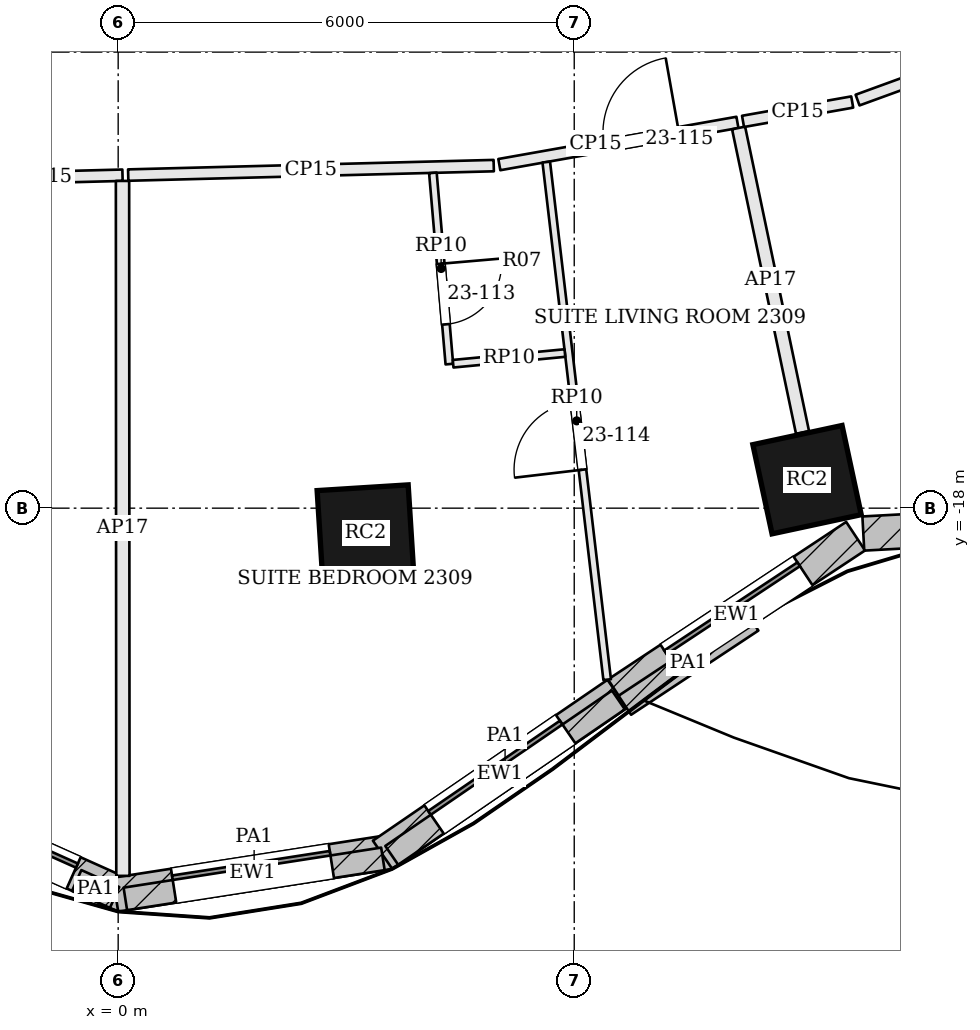
"""IFC4 building model, lengths in metres.
Left out: names, types, materials, properties, quantities, classifications, styles, units other than length and angle.
Written with IfcOpenShell. Run it as: python <this file> out.ifc"""

import sys

from ifc_helpers import new_model, si_unit, direction, frame, frame_2d, origin, origin_2d, place, context, subcontext, project, spatial, rectangle, extrude, element, fill, save


model = new_model("IFC4")
c1 = context("Model", 3, precision=1e-05, world=origin(), true_north=direction((0.0, 1.0)))
c2 = subcontext(c1, "Body", "Model", "MODEL_VIEW")
j1 = project(units=[si_unit("LENGTHUNIT", "METRE"), si_unit("PLANEANGLEUNIT", "RADIAN")], contexts=[c1])
p1 = place(None, origin())
s1 = spatial("IfcSite", under=j1, at=p1, CompositionType="ELEMENT")
p2 = place(p1, origin())
s2 = spatial("IfcBuilding", under=s1, at=p2, CompositionType="ELEMENT")
p3 = place(p2, frame((0.0, 0.0, 99.6)))
s3 = spatial("IfcBuildingStorey", under=s2, at=p3, CompositionType="ELEMENT", Elevation=99.6)
for number, where, z_axis, x_axis in (
    (1, (3.254, -18.33, 0.0), (0.0, 0.0, 1.0), (0.998, 0.063, 0.0)),
    (2, (9.063, -17.625, 0.0), (0.0, 0.0, 1.0), (0.978, 0.21, 0.0)),
):
    element("IfcColumn", number, at=place(p3, frame(where, z_axis=z_axis, x_axis=x_axis)), inside=s3, PredefinedType="COLUMN", context=c2, shape_type="SweptSolid", body=[
        extrude(rectangle(XDim=1.2, YDim=1.2, at=origin_2d()), origin(), (0.0, 0.0, 1.0), 3.6),
    ])
p4 = place(p3, frame((-3.179, -21.636, 0.0), z_axis=(0.0, 0.0, 1.0), x_axis=(0.912608353595, -0.40883492139, 0.0)))
e3 = element("IfcWall", 3, at=p4, inside=s3, PredefinedType="SOLIDWALL", context=c2, shape_type="SweptSolid", body=[
    extrude(rectangle(XDim=3.585, YDim=0.45, at=frame_2d((1.792, 0.0))), origin(), (0.0, 0.0, 1.0), 3.4),
])
p5 = place(p4, frame((0.742, 0.0, 0.9)))
e4 = element("IfcOpeningElement", 4, at=p5, cuts=e3, PredefinedType="OPENING", context=c2, shape_type="SweptSolid", body=[
    extrude(rectangle(XDim=2.1, YDim=2.0, at=frame_2d((1.05, 1.0))), frame((0.0, 0.235, 0.0), z_axis=(0.0, -1.0, 0.0), x_axis=(1.0, 0.0, 0.0)), (0.0, 0.0, 1.0), 0.47),
])
p6 = place(p3, frame((-0.035, -23.085, 0.0), z_axis=(0.0, 0.0, 1.0), x_axis=(0.988133637562, 0.153596596054, 0.0)))
e5 = element("IfcWall", 5, at=p6, inside=s3, PredefinedType="SOLIDWALL", context=c2, shape_type="SweptSolid", body=[
    extrude(rectangle(XDim=3.646, YDim=0.45, at=frame_2d((1.823, 0.0))), origin(), (0.0, 0.0, 1.0), 3.4),
])
p7 = place(p6, frame((0.773, 0.0, 0.9)))
e6 = element("IfcOpeningElement", 6, at=p7, cuts=e5, PredefinedType="OPENING", context=c2, shape_type="SweptSolid", body=[
    extrude(rectangle(XDim=2.1, YDim=2.0, at=frame_2d((1.05, 1.0))), frame((0.0, 0.235, 0.0), z_axis=(0.0, -1.0, 0.0), x_axis=(1.0, 0.0, 0.0)), (0.0, 0.0, 1.0), 0.47),
])
p8 = place(p3, frame((3.479, -22.56, 0.0), z_axis=(0.0, 0.0, 1.0), x_axis=(0.824722766417, 0.565537230033, 0.0)))
e7 = element("IfcWall", 7, at=p8, inside=s3, PredefinedType="SOLIDWALL", context=c2, shape_type="SweptSolid", body=[
    extrude(rectangle(XDim=3.742, YDim=0.45, at=frame_2d((1.871, 0.0))), origin(), (0.0, 0.0, 1.0), 3.4),
])
p9 = place(p8, frame((0.821, 0.0, 0.9)))
e8 = element("IfcOpeningElement", 8, at=p9, cuts=e7, PredefinedType="OPENING", context=c2, shape_type="SweptSolid", body=[
    extrude(rectangle(XDim=2.1, YDim=2.0, at=frame_2d((1.05, 1.0))), frame((0.0, 0.235, 0.0), z_axis=(0.0, -1.0, 0.0), x_axis=(1.0, 0.0, 0.0)), (0.0, 0.0, 1.0), 0.47),
])
p10 = place(p3, frame((6.568, -20.441, 0.0), z_axis=(0.0, 0.0, 1.0), x_axis=(0.834034214531, 0.551712723246, 0.0)))
e9 = element("IfcWall", 9, at=p10, inside=s3, PredefinedType="SOLIDWALL", context=c2, shape_type="SweptSolid", body=[
    extrude(rectangle(XDim=3.757, YDim=0.45, at=frame_2d((1.879, 0.0))), origin(), (0.0, 0.0, 1.0), 3.4),
])
p11 = place(p10, frame((0.829, 0.0, 0.9)))
e10 = element("IfcOpeningElement", 10, at=p11, cuts=e9, PredefinedType="OPENING", context=c2, shape_type="SweptSolid", body=[
    extrude(rectangle(XDim=2.1, YDim=2.0, at=frame_2d((1.05, 1.0))), frame((0.0, 0.235, 0.0), z_axis=(0.0, -1.0, 0.0), x_axis=(1.0, 0.0, 0.0)), (0.0, 0.0, 1.0), 0.47),
])
p12 = place(p3, frame((9.803, -18.334, 0.0), z_axis=(0.0, 0.0, 1.0), x_axis=(0.998525941495, 0.054276552602, 0.0)))
e11 = element("IfcWall", 11, at=p12, inside=s3, PredefinedType="SOLIDWALL", context=c2, shape_type="SweptSolid", body=[
    extrude(rectangle(XDim=3.603, YDim=0.45, at=frame_2d((1.802, 0.0))), origin(), (0.0, 0.0, 1.0), 3.4),
])
p13 = place(p12, frame((0.751, 0.0, 0.9)))
e12 = element("IfcOpeningElement", 12, at=p13, cuts=e11, PredefinedType="OPENING", context=c2, shape_type="SweptSolid", body=[
    extrude(rectangle(XDim=2.1, YDim=2.0, at=frame_2d((1.05, 1.0))), frame((0.0, 0.235, 0.0), z_axis=(0.0, -1.0, 0.0), x_axis=(1.0, 0.0, 0.0)), (0.0, 0.0, 1.0), 0.47),
])
p14 = place(p3, frame((-0.545, -22.898, 3.6), z_axis=(0.0, 0.0, 1.0), x_axis=(0.912497815069, -0.409081578044, 0.0)))
e13 = element("IfcWall", 13, at=p14, inside=s3, PredefinedType="PARAPET", context=c2, shape_type="SweptSolid", body=[
    extrude(rectangle(XDim=0.546, YDim=0.3, at=frame_2d((0.273, 0.0))), origin(), (0.0, 0.0, 1.0), 1.1),
])
p15 = place(p3, frame((0.094, -23.14, 3.6), z_axis=(0.0, 0.0, 1.0), x_axis=(0.988150084887, 0.153490748056, 0.0)))
e14 = element("IfcWall", 14, at=p15, inside=s3, PredefinedType="PARAPET", context=c2, shape_type="SweptSolid", body=[
    extrude(rectangle(XDim=3.429, YDim=0.3, at=frame_2d((1.715, 0.0))), origin(), (0.0, 0.0, 1.0), 1.1),
])
p16 = place(p3, frame((3.599, -22.568, 3.6), z_axis=(0.0, 0.0, 1.0), x_axis=(0.82476034254, 0.565482428881, 0.0)))
e15 = element("IfcWall", 15, at=p16, inside=s3, PredefinedType="PARAPET", context=c2, shape_type="SweptSolid", body=[
    extrude(rectangle(XDim=3.616, YDim=0.3, at=frame_2d((1.808, 0.0))), origin(), (0.0, 0.0, 1.0), 1.1),
])
p17 = place(p3, frame((6.665, -20.593, 3.6), z_axis=(0.0, 0.0, 1.0), x_axis=(0.834027642059, 0.551722658843, 0.0)))
e16 = element("IfcWall", 16, at=p17, inside=s3, PredefinedType="PARAPET", context=c2, shape_type="SweptSolid", body=[
    extrude(rectangle(XDim=2.008, YDim=0.3, at=frame_2d((1.004, 0.0))), origin(), (0.0, 0.0, 1.0), 1.1),
])
p18 = place(p3, frame((-1.957, -13.672, 0.0), z_axis=(0.0, 0.0, 1.0), x_axis=(0.999663662109, 0.025933813031, 0.0)))
e17 = element("IfcWall", 17, at=p18, inside=s3, PredefinedType="PARTITIONING", context=c2, shape_type="SweptSolid", body=[
    extrude(rectangle(XDim=2.015, YDim=0.15, at=frame_2d((1.007, 0.0))), origin(), (0.0, 0.0, 1.0), 2.784),
])
p19 = place(p3, frame((0.062, -22.837, 0.0), z_axis=(0.0, 0.0, 1.0), x_axis=(-0.000614184887, 0.999999811388, 0.0)))
e18 = element("IfcWall", 18, at=p19, inside=s3, PredefinedType="PARTITIONING", context=c2, shape_type="SweptSolid", body=[
    extrude(rectangle(XDim=9.143, YDim=0.175, at=frame_2d((4.571, 0.0))), origin(), (0.0, 0.0, 1.0), 2.784),
])
p20 = place(p3, frame((0.132, -13.618, 0.0), z_axis=(0.0, 0.0, 1.0), x_axis=(0.999664963682, 0.025883593008, 0.0)))
e19 = element("IfcWall", 19, at=p20, inside=s3, PredefinedType="PARTITIONING", context=c2, shape_type="SweptSolid", body=[
    extrude(rectangle(XDim=4.811, YDim=0.15, at=frame_2d((2.405, 0.0))), origin(), (0.0, 0.0, 1.0), 2.784),
])
p21 = place(p3, frame((5.015, -13.48, 0.0), z_axis=(0.0, 0.0, 1.0), x_axis=(0.984640294338, 0.174595219768, 0.0)))
e20 = element("IfcWall", 20, at=p21, inside=s3, PredefinedType="PARTITIONING", context=c2, shape_type="SweptSolid", body=[
    extrude(rectangle(XDim=3.181, YDim=0.15, at=frame_2d((1.591, 0.0))), origin(), (0.0, 0.0, 1.0), 2.784),
])
p22 = place(p21, frame((1.4, 0.0, 0.0)))
e21 = element("IfcOpeningElement", 21, at=p22, cuts=e20, PredefinedType="OPENING", context=c2, shape_type="SweptSolid", body=[
    extrude(rectangle(XDim=1.0, YDim=2.1, at=frame_2d((0.5, 1.05))), frame((0.0, 0.085, 0.0), z_axis=(0.0, -1.0, 0.0), x_axis=(1.0, 0.0, 0.0)), (0.0, 0.0, 1.0), 0.17),
])
p23 = place(p3, frame((9.003, -17.004, 0.0), z_axis=(0.0, 0.0, 1.0), x_axis=(-0.205490383359, 0.978659134912, 0.0)))
e22 = element("IfcWall", 22, at=p23, inside=s3, PredefinedType="PARTITIONING", context=c2, shape_type="SweptSolid", body=[
    extrude(rectangle(XDim=4.093, YDim=0.175, at=frame_2d((2.046, 0.0))), origin(), (0.0, 0.0, 1.0), 2.784),
])
p24 = place(p3, frame((8.221, -12.912, 0.0), z_axis=(0.0, 0.0, 1.0), x_axis=(0.984645082055, 0.174568216995, 0.0)))
e23 = element("IfcWall", 23, at=p24, inside=s3, PredefinedType="PARTITIONING", context=c2, shape_type="SweptSolid", body=[
    extrude(rectangle(XDim=1.459, YDim=0.15, at=frame_2d((0.729, 0.0))), origin(), (0.0, 0.0, 1.0), 2.784),
])
p25 = place(p3, frame((9.728, -12.631, 0.0), z_axis=(0.0, 0.0, 1.0), x_axis=(0.939626438181, 0.342201923826, 0.0)))
e24 = element("IfcWall", 24, at=p25, inside=s3, PredefinedType="PARTITIONING", context=c2, shape_type="SweptSolid", body=[
    extrude(rectangle(XDim=3.716, YDim=0.15, at=frame_2d((1.858, 0.0))), origin(), (0.0, 0.0, 1.0), 2.784),
])
p26 = place(p25, frame((1.45, 0.0, 0.0)))
e25 = element("IfcOpeningElement", 25, at=p26, cuts=e24, PredefinedType="OPENING", context=c2, shape_type="SweptSolid", body=[
    extrude(rectangle(XDim=1.8, YDim=2.1, at=frame_2d((0.9, 1.05))), frame((0.0, 0.085, 0.0), z_axis=(0.0, -1.0, 0.0), x_axis=(1.0, 0.0, 0.0)), (0.0, 0.0, 1.0), 0.17),
])
p27 = place(p3, frame((6.433, -20.256, 0.0), z_axis=(0.0, 0.0, 1.0), x_axis=(-0.116866039573, 0.993147687303, 0.0)))
e26 = element("IfcWall", 26, at=p27, inside=s3, PredefinedType="PARTITIONING", context=c2, shape_type="SweptSolid", body=[
    extrude(rectangle(XDim=6.856, YDim=0.1, at=frame_2d((3.428, 0.0))), origin(), (0.0, 0.0, 1.0), 2.784),
])
p28 = place(p27, frame((2.781, 0.0, 0.0)))
e27 = element("IfcOpeningElement", 27, at=p28, cuts=e26, PredefinedType="OPENING", context=c2, shape_type="SweptSolid", body=[
    extrude(rectangle(XDim=0.9, YDim=2.4, at=frame_2d((0.45, 1.2))), frame((0.0, 0.06, 0.0), z_axis=(0.0, -1.0, 0.0), x_axis=(1.0, 0.0, 0.0)), (0.0, 0.0, 1.0), 0.12),
])
p29 = place(p3, frame((4.14, -13.589, 0.0), z_axis=(0.0, 0.0, 1.0), x_axis=(0.085765885777, -0.996315317978, 0.0)))
e28 = element("IfcWall", 28, at=p29, inside=s3, PredefinedType="PARTITIONING", context=c2, shape_type="SweptSolid", body=[
    extrude(rectangle(XDim=2.525, YDim=0.1, at=frame_2d((1.262, 0.0))), origin(), (0.0, 0.0, 1.0), 2.784),
])
p30 = place(p29, frame((1.2, 0.0, 0.0)))
e29 = element("IfcOpeningElement", 29, at=p30, cuts=e28, PredefinedType="OPENING", context=c2, shape_type="SweptSolid", body=[
    extrude(rectangle(XDim=0.8, YDim=2.1, at=frame_2d((0.4, 1.05))), frame((0.0, 0.06, 0.0), z_axis=(0.0, -1.0, 0.0), x_axis=(1.0, 0.0, 0.0)), (0.0, 0.0, 1.0), 0.12),
])
p31 = place(p3, frame((4.407, -16.1, 0.0), z_axis=(0.0, 0.0, 1.0), x_axis=(0.995458255501, 0.095199062787, 0.0)))
e30 = element("IfcWall", 30, at=p31, inside=s3, PredefinedType="PARTITIONING", context=c2, shape_type="SweptSolid", body=[
    extrude(rectangle(XDim=1.477, YDim=0.1, at=frame_2d((0.739, 0.0))), origin(), (0.0, 0.0, 1.0), 2.784),
])
p32 = place(p5, origin())
e31 = element("IfcWindow", 31, at=p32, inside=s3, PartitioningType="SINGLE_PANEL", PredefinedType="WINDOW", context=c2, shape_type="SweptSolid", body=[
    extrude(rectangle(XDim=2.1, YDim=2.0, at=frame_2d((1.05, 1.0))), frame((0.0, 0.135, 0.0), z_axis=(0.0, -1.0, 0.0), x_axis=(1.0, 0.0, 0.0)), (0.0, 0.0, 1.0), 0.06),
])
fill(e4, e31)
p33 = place(p7, origin())
e32 = element("IfcWindow", 32, at=p33, inside=s3, PartitioningType="SINGLE_PANEL", PredefinedType="WINDOW", context=c2, shape_type="SweptSolid", body=[
    extrude(rectangle(XDim=2.1, YDim=2.0, at=frame_2d((1.05, 1.0))), frame((0.0, 0.135, 0.0), z_axis=(0.0, -1.0, 0.0), x_axis=(1.0, 0.0, 0.0)), (0.0, 0.0, 1.0), 0.06),
])
fill(e6, e32)
p34 = place(p9, origin())
e33 = element("IfcWindow", 33, at=p34, inside=s3, PartitioningType="SINGLE_PANEL", PredefinedType="WINDOW", context=c2, shape_type="SweptSolid", body=[
    extrude(rectangle(XDim=2.1, YDim=2.0, at=frame_2d((1.05, 1.0))), frame((0.0, 0.135, 0.0), z_axis=(0.0, -1.0, 0.0), x_axis=(1.0, 0.0, 0.0)), (0.0, 0.0, 1.0), 0.06),
])
fill(e8, e33)
p35 = place(p11, origin())
e34 = element("IfcWindow", 34, at=p35, inside=s3, PartitioningType="SINGLE_PANEL", PredefinedType="WINDOW", context=c2, shape_type="SweptSolid", body=[
    extrude(rectangle(XDim=2.1, YDim=2.0, at=frame_2d((1.05, 1.0))), frame((0.0, 0.135, 0.0), z_axis=(0.0, -1.0, 0.0), x_axis=(1.0, 0.0, 0.0)), (0.0, 0.0, 1.0), 0.06),
])
fill(e10, e34)
p36 = place(p30, origin())
e35 = element("IfcDoor", 35, at=p36, inside=s3, OperationType="SINGLE_SWING_LEFT", PredefinedType="DOOR", context=c2, shape_type="SweptSolid", body=[
    extrude(rectangle(XDim=0.8, YDim=2.1, at=frame_2d((0.4, 1.05))), frame((0.0, 0.025, 0.0), z_axis=(0.0, -1.0, 0.0), x_axis=(1.0, 0.0, 0.0)), (0.0, 0.0, 1.0), 0.05),
])
fill(e29, e35)
p37 = place(p28, origin())
e36 = element("IfcDoor", 36, at=p37, inside=s3, OperationType="SINGLE_SWING_LEFT", PredefinedType="DOOR", context=c2, shape_type="SweptSolid", body=[
    extrude(rectangle(XDim=0.9, YDim=2.4, at=frame_2d((0.45, 1.2))), frame((0.0, 0.025, 0.0), z_axis=(0.0, -1.0, 0.0), x_axis=(1.0, 0.0, 0.0)), (0.0, 0.0, 1.0), 0.05),
])
fill(e27, e36)
p38 = place(p22, origin())
e37 = element("IfcDoor", 37, at=p38, inside=s3, OperationType="SINGLE_SWING_RIGHT", PredefinedType="DOOR", context=c2, shape_type="SweptSolid", body=[
    extrude(rectangle(XDim=1.0, YDim=2.1, at=frame_2d((0.5, 1.05))), frame((0.0, 0.025, 0.0), z_axis=(0.0, -1.0, 0.0), x_axis=(1.0, 0.0, 0.0)), (0.0, 0.0, 1.0), 0.05),
])
fill(e21, e37)
save(model, sys.argv[1])
